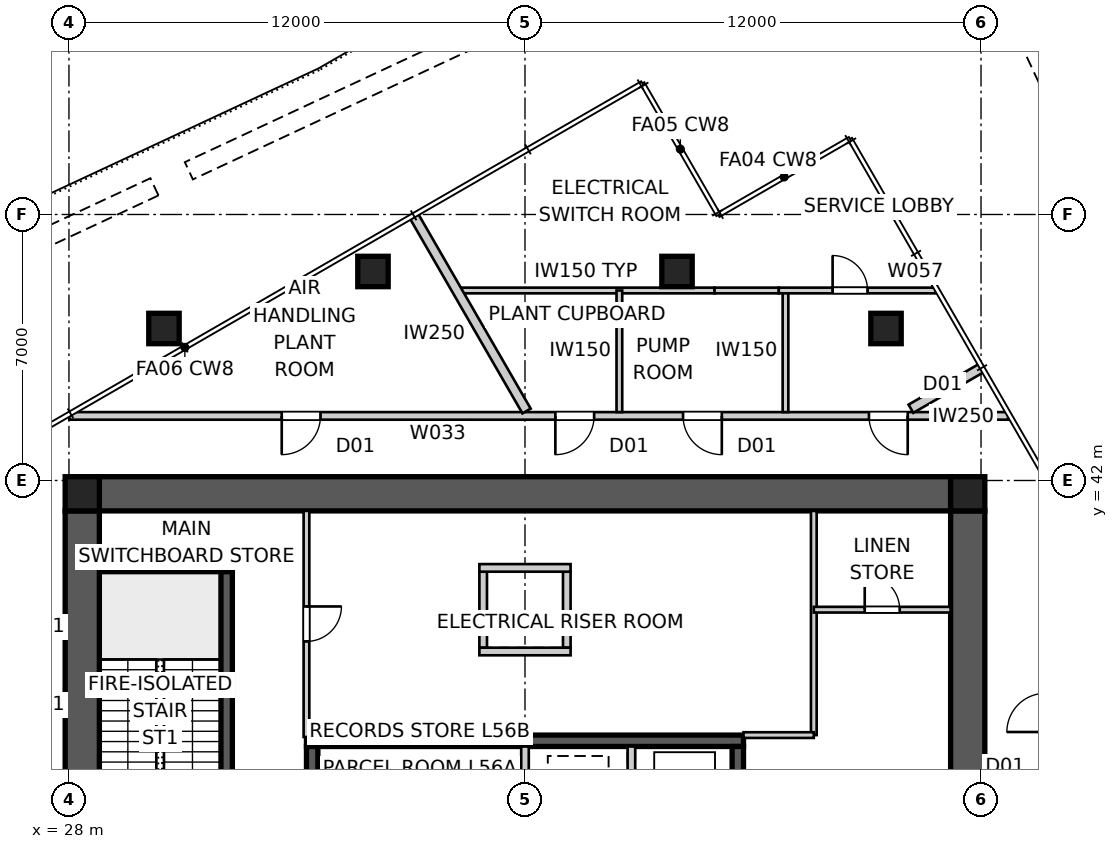
"""IFC4 building model, lengths in metres.
Left out: names, types, materials, properties, quantities, classifications, styles, units other than length and angle.
Written with IfcOpenShell. Run it as: python <this file> out.ifc"""

import sys

from ifc_helpers import new_model, si_unit, direction, frame, frame_2d, origin, origin_2d, place, context, subcontext, project, spatial, polyline, rectangle, outline, extrude, element, fill, save


model = new_model("IFC4")
c1 = context("Model", 3, precision=1e-05, world=origin(), true_north=direction((0.0, 1.0)))
c2 = subcontext(c1, "Body", "Model", "MODEL_VIEW")
j1 = project(units=[si_unit("LENGTHUNIT", "METRE"), si_unit("PLANEANGLEUNIT", "RADIAN")], contexts=[c1])
p1 = place(None, origin())
s1 = spatial("IfcSite", under=j1, at=p1, CompositionType="ELEMENT")
p2 = place(p1, origin())
s2 = spatial("IfcBuilding", under=s1, at=p2, CompositionType="ELEMENT")
p3 = place(p2, frame((0.0, 0.0, 203.2)))
s3 = spatial("IfcBuildingStorey", under=s2, at=p3, CompositionType="ELEMENT", Elevation=203.2)
p4 = place(p3, frame((28.8, 41.65, 0.0), z_axis=(0.0, 0.0, 1.0), x_axis=(1.0, 0.0, 0.0)))
e1 = element("IfcWall", 1, at=p4, inside=s3, PredefinedType="SHEAR", context=c2, shape_type="SweptSolid", body=[
    extrude(outline(polyline([(0.0, -0.45), (22.4, -0.45), (22.4, -0.025), (22.85, -0.025), (22.85, 0.025), (22.4, 0.025), (22.4, 0.45), (0.0, 0.45), (0.0, 0.025), (-0.45, 0.025), (-0.45, -0.025), (0.0, -0.025), (0.0, -0.45)])), origin(), (0.0, 0.0, 1.0), 5.0),
])
p5 = place(p3, frame((51.65, 18.8, 0.0), z_axis=(0.0, 0.0, 1.0), x_axis=(0.0, 1.0, 0.0)))
e2 = element("IfcWall", 2, at=p5, inside=s3, PredefinedType="SHEAR", context=c2, shape_type="SweptSolid", body=[
    extrude(outline(polyline([(0.0, -0.45), (22.4, -0.45), (22.4, -0.025), (22.85, -0.025), (22.85, 0.025), (22.4, 0.025), (22.4, 0.45), (0.0, 0.45), (0.0, 0.025), (-0.45, 0.025), (-0.45, -0.025), (0.0, -0.025), (0.0, -0.45)])), origin(), (0.0, 0.0, 1.0), 5.0),
])
p6 = place(p5, frame((11.14, 0.0, 0.0)))
e3 = element("IfcOpeningElement", 3, at=p6, cuts=e2, PredefinedType="OPENING", context=c2, shape_type="SweptSolid", body=[
    extrude(rectangle(XDim=1.02, YDim=2.4, at=frame_2d((0.51, 1.2))), frame((0.0, 0.46, 0.0), z_axis=(0.0, -1.0, 0.0), x_axis=(1.0, 0.0, 0.0)), (0.0, 0.0, 1.0), 0.92),
])
p7 = place(p3, frame((28.35, 41.2, 0.0), z_axis=(0.0, 0.0, 1.0), x_axis=(0.0, -1.0, 0.0)))
e4 = element("IfcWall", 4, at=p7, inside=s3, PredefinedType="SHEAR", context=c2, shape_type="SweptSolid", body=[
    extrude(outline(polyline([(0.0, -0.45), (22.4, -0.45), (22.4, -0.025), (22.85, -0.025), (22.85, 0.025), (22.4, 0.025), (22.4, 0.45), (0.0, 0.45), (0.0, 0.025), (-0.45, 0.025), (-0.45, -0.025), (0.0, -0.025), (0.0, -0.45)])), origin(), (0.0, 0.0, 1.0), 5.0),
])
p8 = place(p7, frame((11.14, 0.0, 0.0)))
e5 = element("IfcOpeningElement", 5, at=p8, cuts=e4, PredefinedType="OPENING", context=c2, shape_type="SweptSolid", body=[
    extrude(rectangle(XDim=1.02, YDim=2.4, at=frame_2d((0.51, 1.2))), frame((0.0, 0.46, 0.0), z_axis=(0.0, -1.0, 0.0), x_axis=(1.0, 0.0, 0.0)), (0.0, 0.0, 1.0), 0.92),
])
p9 = place(p3, frame((34.25, 35.15, 0.0), z_axis=(0.0, 0.0, 1.0), x_axis=(1.0, 0.0, 0.0)))
e6 = element("IfcWall", 6, at=p9, inside=s3, PredefinedType="SHEAR", context=c2, shape_type="SweptSolid", body=[
    extrude(rectangle(XDim=11.5, YDim=0.3, at=frame_2d((5.75, 0.0))), origin(), (0.0, 0.0, 1.0), 5.0),
])
p10 = place(p3, frame((34.4, 32.2, 0.0), z_axis=(0.0, 0.0, 1.0), x_axis=(0.0, 1.0, 0.0)))
e7 = element("IfcWall", 7, at=p10, inside=s3, PredefinedType="SHEAR", context=c2, shape_type="SweptSolid", body=[
    extrude(rectangle(XDim=2.8, YDim=0.3, at=frame_2d((1.4, 0.0))), origin(), (0.0, 0.0, 1.0), 5.0),
])
for number, where, z_axis, x_axis in (
    (8, (40.0, 32.2, 0.0), (0.0, 0.0, 1.0), (0.0, 1.0, 0.0)),
    (9, (42.8, 32.2, 0.0), (0.0, 0.0, 1.0), (0.0, 1.0, 0.0)),
):
    element("IfcWall", number, at=place(p3, frame(where, z_axis=z_axis, x_axis=x_axis)), inside=s3, PredefinedType="SOLIDWALL", context=c2, shape_type="SweptSolid", body=[
        extrude(rectangle(XDim=2.8, YDim=0.2, at=frame_2d((1.4, 0.0))), origin(), (0.0, 0.0, 1.0), 5.0),
    ])
p11 = place(p3, frame((45.6, 32.2, 0.0), z_axis=(0.0, 0.0, 1.0), x_axis=(0.0, 1.0, 0.0)))
e10 = element("IfcWall", 10, at=p11, inside=s3, PredefinedType="SHEAR", context=c2, shape_type="SweptSolid", body=[
    extrude(rectangle(XDim=2.8, YDim=0.3, at=frame_2d((1.4, 0.0))), origin(), (0.0, 0.0, 1.0), 5.0),
])
p12 = place(p3, frame((32.15, 32.2, 0.0), z_axis=(0.0, 0.0, 1.0), x_axis=(0.0, 1.0, 0.0)))
e11 = element("IfcWall", 11, at=p12, inside=s3, PredefinedType="SHEAR", context=c2, shape_type="SweptSolid", body=[
    extrude(rectangle(XDim=7.7, YDim=0.3, at=frame_2d((3.85, 0.0))), origin(), (0.0, 0.0, 1.0), 5.0),
])
p13 = place(p3, frame((28.8, 39.75, 0.0), z_axis=(0.0, 0.0, 1.0), x_axis=(1.0, 0.0, 0.0)))
e12 = element("IfcWall", 12, at=p13, inside=s3, PredefinedType="SHEAR", context=c2, shape_type="SweptSolid", body=[
    extrude(rectangle(XDim=3.5, YDim=0.3, at=frame_2d((1.75, 0.0))), origin(), (0.0, 0.0, 1.0), 5.0),
])
for number, where, z_axis, x_axis in (
    (13, (38.9, 37.6, 0.0), (0.0, 0.0, 1.0), (0.0, 1.0, 0.0)),
    (14, (41.1, 37.6, 0.0), (0.0, 0.0, 1.0), (0.0, 1.0, 0.0)),
):
    element("IfcWall", number, at=place(p3, frame(where, z_axis=z_axis, x_axis=x_axis)), inside=s3, PredefinedType="SOLIDWALL", context=c2, shape_type="SweptSolid", body=[
        extrude(rectangle(XDim=2.0, YDim=0.2, at=frame_2d((1.0, 0.0))), origin(), (0.0, 0.0, 1.0), 5.0),
    ])
for number, where, z_axis, x_axis in (
    (15, (38.8, 37.5, 0.0), (0.0, 0.0, 1.0), (1.0, 0.0, 0.0)),
    (16, (38.8, 39.7, 0.0), (0.0, 0.0, 1.0), (1.0, 0.0, 0.0)),
):
    element("IfcWall", number, at=place(p3, frame(where, z_axis=z_axis, x_axis=x_axis)), inside=s3, PredefinedType="SOLIDWALL", context=c2, shape_type="SweptSolid", body=[
        extrude(rectangle(XDim=2.4, YDim=0.2, at=frame_2d((1.2, 0.0))), origin(), (0.0, 0.0, 1.0), 5.0),
    ])
for number, where, z_axis, x_axis in (
    (17, (51.65, 41.65, 0.0), (0.0, 0.0, 1.0), (1.0, 0.0, 0.0)),
    (18, (28.35, 41.65, 0.0), (0.0, 0.0, 1.0), (1.0, 0.0, 0.0)),
):
    element("IfcColumn", number, at=place(p3, frame(where, z_axis=z_axis, x_axis=x_axis)), inside=s3, PredefinedType="COLUMN", context=c2, shape_type="SweptSolid", body=[
        extrude(rectangle(XDim=0.9, YDim=0.9, at=origin_2d()), origin(), (0.0, 0.0, 1.0), 5.0),
    ])
for number, where, z_axis, x_axis in (
    (19, (49.5, 46.0, 0.0), (0.0, 0.0, 1.0), (1.0, 0.0, 0.0)),
    (20, (44.0, 47.5, 0.0), (0.0, 0.0, 1.0), (1.0, 0.0, 0.0)),
    (21, (36.0, 47.5, 0.0), (0.0, 0.0, 1.0), (1.0, 0.0, 0.0)),
    (22, (30.5, 46.0, 0.0), (0.0, 0.0, 1.0), (1.0, 0.0, 0.0)),
):
    element("IfcColumn", number, at=place(p3, frame(where, z_axis=z_axis, x_axis=x_axis)), inside=s3, PredefinedType="COLUMN", context=c2, shape_type="SweptSolid", body=[
        extrude(rectangle(XDim=0.8, YDim=0.8, at=origin_2d()), origin(), (0.0, 0.0, 1.0), 5.0),
    ])
p14 = place(p3, frame((52.713, 43.7, 0.0), z_axis=(0.0, 0.0, 1.0), x_axis=(-1.0, 0.0, 0.0)))
e23 = element("IfcWall", 23, at=p14, inside=s3, PredefinedType="PARTITIONING", context=c2, shape_type="SweptSolid", body=[
    extrude(rectangle(XDim=24.704, YDim=0.2, at=frame_2d((12.352, 0.0))), origin(), (0.0, 0.0, 1.0), 4.85),
])
p15 = place(p14, frame((18.094, 0.0, 0.0)))
e24 = element("IfcOpeningElement", 24, at=p15, cuts=e23, PredefinedType="OPENING", context=c2, shape_type="SweptSolid", body=[
    extrude(rectangle(XDim=1.02, YDim=2.34, at=frame_2d((0.51, 1.17))), frame((0.0, 0.11, 0.0), z_axis=(0.0, -1.0, 0.0), x_axis=(1.0, 0.0, 0.0)), (0.0, 0.0, 1.0), 0.22),
])
p16 = place(p14, frame((2.642, 0.0, 0.0)))
e25 = element("IfcOpeningElement", 25, at=p16, cuts=e23, PredefinedType="OPENING", context=c2, shape_type="SweptSolid", body=[
    extrude(rectangle(XDim=1.02, YDim=2.34, at=frame_2d((0.51, 1.17))), frame((0.0, 0.11, 0.0), z_axis=(0.0, -1.0, 0.0), x_axis=(1.0, 0.0, 0.0)), (0.0, 0.0, 1.0), 0.22),
])
p17 = place(p14, frame((7.534, 0.0, 0.0)))
e26 = element("IfcOpeningElement", 26, at=p17, cuts=e23, PredefinedType="OPENING", context=c2, shape_type="SweptSolid", body=[
    extrude(rectangle(XDim=1.02, YDim=2.34, at=frame_2d((0.51, 1.17))), frame((0.0, 0.11, 0.0), z_axis=(0.0, -1.0, 0.0), x_axis=(1.0, 0.0, 0.0)), (0.0, 0.0, 1.0), 0.22),
])
p18 = place(p14, frame((10.894, 0.0, 0.0)))
e27 = element("IfcOpeningElement", 27, at=p18, cuts=e23, PredefinedType="OPENING", context=c2, shape_type="SweptSolid", body=[
    extrude(rectangle(XDim=1.02, YDim=2.34, at=frame_2d((0.51, 1.17))), frame((0.0, 0.11, 0.0), z_axis=(0.0, -1.0, 0.0), x_axis=(1.0, 0.0, 0.0)), (0.0, 0.0, 1.0), 0.22),
])
p19 = place(p3, frame((52.027, 44.969, 0.0), z_axis=(0.0, 0.0, 1.0), x_axis=(-0.865974878747, -0.500087501723, 0.0)))
e28 = element("IfcWall", 28, at=p19, inside=s3, PredefinedType="PARTITIONING", context=c2, shape_type="SweptSolid", body=[
    extrude(rectangle(XDim=2.161, YDim=0.25, at=frame_2d((1.081, 0.0))), origin(), (0.0, 0.0, 1.0), 4.85),
])
p20 = place(p3, frame((37.069, 48.977, 0.0), z_axis=(0.0, 0.0, 1.0), x_axis=(0.500021028785, -0.866013262469, 0.0)))
e29 = element("IfcWall", 29, at=p20, inside=s3, PredefinedType="PARTITIONING", context=c2, shape_type="SweptSolid", body=[
    extrude(rectangle(XDim=5.946, YDim=0.25, at=frame_2d((2.973, 0.0))), origin(), (0.0, 0.0, 1.0), 4.85),
])
p21 = place(p3, frame((34.25, 41.2, 0.0), z_axis=(0.0, 0.0, 1.0), x_axis=(0.0, -1.0, 0.0)))
e30 = element("IfcWall", 30, at=p21, inside=s3, PredefinedType="SOLIDWALL", context=c2, shape_type="SweptSolid", body=[
    extrude(rectangle(XDim=5.95, YDim=0.15, at=frame_2d((2.975, 0.0))), origin(), (0.0, 0.0, 1.0), 4.85),
])
p22 = place(p21, frame((2.515, 0.0, 0.0)))
e31 = element("IfcOpeningElement", 31, at=p22, cuts=e30, PredefinedType="OPENING", context=c2, shape_type="SweptSolid", body=[
    extrude(rectangle(XDim=0.92, YDim=2.1, at=frame_2d((0.46, 1.05))), frame((0.0, 0.085, 0.0), z_axis=(0.0, -1.0, 0.0), x_axis=(1.0, 0.0, 0.0)), (0.0, 0.0, 1.0), 0.17),
])
p23 = place(p3, frame((47.6, 41.2, 0.0), z_axis=(0.0, 0.0, 1.0), x_axis=(0.0, -1.0, 0.0)))
e32 = element("IfcWall", 32, at=p23, inside=s3, PredefinedType="SOLIDWALL", context=c2, shape_type="SweptSolid", body=[
    extrude(rectangle(XDim=5.9, YDim=0.15, at=frame_2d((2.95, 0.0))), origin(), (0.0, 0.0, 1.0), 4.85),
])
p24 = place(p3, frame((47.6, 35.3, 0.0), z_axis=(0.0, 0.0, 1.0), x_axis=(-1.0, 0.0, 0.0)))
e33 = element("IfcWall", 33, at=p24, inside=s3, PredefinedType="SOLIDWALL", context=c2, shape_type="SweptSolid", body=[
    extrude(rectangle(XDim=1.85, YDim=0.15, at=frame_2d((0.925, 0.0))), origin(), (0.0, 0.0, 1.0), 4.85),
])
p25 = place(p3, frame((47.6, 38.6, 0.0), z_axis=(0.0, 0.0, 1.0), x_axis=(1.0, 0.0, 0.0)))
e34 = element("IfcWall", 34, at=p25, inside=s3, PredefinedType="SOLIDWALL", context=c2, shape_type="SweptSolid", body=[
    extrude(rectangle(XDim=3.6, YDim=0.15, at=frame_2d((1.8, 0.0))), origin(), (0.0, 0.0, 1.0), 4.85),
])
p26 = place(p25, frame((1.34, 0.0, 0.0)))
e35 = element("IfcOpeningElement", 35, at=p26, cuts=e34, PredefinedType="OPENING", context=c2, shape_type="SweptSolid", body=[
    extrude(rectangle(XDim=0.92, YDim=2.1, at=frame_2d((0.46, 1.05))), frame((0.0, 0.085, 0.0), z_axis=(0.0, -1.0, 0.0), x_axis=(1.0, 0.0, 0.0)), (0.0, 0.0, 1.0), 0.17),
])
p27 = place(p3, frame((46.855, 43.8, 0.0), z_axis=(0.0, 0.0, 1.0), x_axis=(0.0, 1.0, 0.0)))
e36 = element("IfcWall", 36, at=p27, inside=s3, PredefinedType="SOLIDWALL", context=c2, shape_type="SweptSolid", body=[
    extrude(rectangle(XDim=3.2, YDim=0.15, at=frame_2d((1.6, 0.0))), origin(), (0.0, 0.0, 1.0), 4.85),
])
p28 = place(p3, frame((38.21, 47.0, 0.0), z_axis=(0.0, 0.0, 1.0), x_axis=(1.0, 0.0, 0.0)))
e37 = element("IfcWall", 37, at=p28, inside=s3, PredefinedType="SOLIDWALL", context=c2, shape_type="SweptSolid", body=[
    extrude(rectangle(XDim=6.778, YDim=0.15, at=frame_2d((3.389, 0.0))), origin(), (0.0, 0.0, 1.0), 4.85),
])
p29 = place(p3, frame((44.988, 47.0, 0.0), z_axis=(0.0, 0.0, 1.0), x_axis=(1.0, 0.0, 0.0)))
e38 = element("IfcWall", 38, at=p29, inside=s3, PredefinedType="SOLIDWALL", context=c2, shape_type="SweptSolid", body=[
    extrude(rectangle(XDim=1.69, YDim=0.15, at=frame_2d((0.845, 0.0))), origin(), (0.0, 0.0, 1.0), 3.85),
])
p30 = place(p3, frame((46.678, 47.0, 0.0), z_axis=(0.0, 0.0, 1.0), x_axis=(1.0, 0.0, 0.0)))
e39 = element("IfcWall", 39, at=p30, inside=s3, PredefinedType="SOLIDWALL", context=c2, shape_type="SweptSolid", body=[
    extrude(rectangle(XDim=4.13, YDim=0.15, at=frame_2d((2.065, 0.0))), origin(), (0.0, 0.0, 1.0), 4.85),
])
p31 = place(p30, frame((1.416, 0.0, 0.0)))
e40 = element("IfcOpeningElement", 40, at=p31, cuts=e39, PredefinedType="OPENING", context=c2, shape_type="SweptSolid", body=[
    extrude(rectangle(XDim=0.92, YDim=2.1, at=frame_2d((0.46, 1.05))), frame((0.0, 0.085, 0.0), z_axis=(0.0, -1.0, 0.0), x_axis=(1.0, 0.0, 0.0)), (0.0, 0.0, 1.0), 0.17),
])
p32 = place(p3, frame((42.484, 43.8, 0.0), z_axis=(0.0, 0.0, 1.0), x_axis=(0.0, 1.0, 0.0)))
e41 = element("IfcWall", 41, at=p32, inside=s3, PredefinedType="SOLIDWALL", context=c2, shape_type="SweptSolid", body=[
    extrude(rectangle(XDim=3.2, YDim=0.15, at=frame_2d((1.6, 0.0))), origin(), (0.0, 0.0, 1.0), 4.85),
])
p33 = place(p15, origin())
e42 = element("IfcDoor", 42, at=p33, inside=s3, OperationType="SINGLE_SWING_RIGHT", PredefinedType="DOOR", context=c2, shape_type="SweptSolid", body=[
    extrude(rectangle(XDim=1.02, YDim=2.34, at=frame_2d((0.51, 1.17))), frame((0.0, 0.025, 0.0), z_axis=(0.0, -1.0, 0.0), x_axis=(1.0, 0.0, 0.0)), (0.0, 0.0, 1.0), 0.05),
])
fill(e24, e42)
p34 = place(p16, origin())
e43 = element("IfcDoor", 43, at=p34, inside=s3, OperationType="SINGLE_SWING_LEFT", PredefinedType="DOOR", context=c2, shape_type="SweptSolid", body=[
    extrude(rectangle(XDim=1.02, YDim=2.34, at=frame_2d((0.51, 1.17))), frame((0.0, 0.025, 0.0), z_axis=(0.0, -1.0, 0.0), x_axis=(1.0, 0.0, 0.0)), (0.0, 0.0, 1.0), 0.05),
])
fill(e25, e43)
p35 = place(p17, origin())
e44 = element("IfcDoor", 44, at=p35, inside=s3, OperationType="SINGLE_SWING_LEFT", PredefinedType="DOOR", context=c2, shape_type="SweptSolid", body=[
    extrude(rectangle(XDim=1.02, YDim=2.34, at=frame_2d((0.51, 1.17))), frame((0.0, 0.025, 0.0), z_axis=(0.0, -1.0, 0.0), x_axis=(1.0, 0.0, 0.0)), (0.0, 0.0, 1.0), 0.05),
])
fill(e26, e44)
p36 = place(p18, origin())
e45 = element("IfcDoor", 45, at=p36, inside=s3, OperationType="SINGLE_SWING_RIGHT", PredefinedType="DOOR", context=c2, shape_type="SweptSolid", body=[
    extrude(rectangle(XDim=1.02, YDim=2.34, at=frame_2d((0.51, 1.17))), frame((0.0, 0.025, 0.0), z_axis=(0.0, -1.0, 0.0), x_axis=(1.0, 0.0, 0.0)), (0.0, 0.0, 1.0), 0.05),
])
fill(e27, e45)
p37 = place(p26, origin())
e46 = element("IfcDoor", 46, at=p37, inside=s3, OperationType="SINGLE_SWING_LEFT", PredefinedType="DOOR", context=c2, shape_type="SweptSolid", body=[
    extrude(rectangle(XDim=0.92, YDim=2.1, at=frame_2d((0.46, 1.05))), frame((0.0, 0.025, 0.0), z_axis=(0.0, -1.0, 0.0), x_axis=(1.0, 0.0, 0.0)), (0.0, 0.0, 1.0), 0.05),
])
fill(e35, e46)
p38 = place(p22, origin())
e47 = element("IfcDoor", 47, at=p38, inside=s3, OperationType="SINGLE_SWING_LEFT", PredefinedType="DOOR", context=c2, shape_type="SweptSolid", body=[
    extrude(rectangle(XDim=0.92, YDim=2.1, at=frame_2d((0.46, 1.05))), frame((0.0, 0.025, 0.0), z_axis=(0.0, -1.0, 0.0), x_axis=(1.0, 0.0, 0.0)), (0.0, 0.0, 1.0), 0.05),
])
fill(e31, e47)
p39 = place(p31, origin())
e48 = element("IfcDoor", 48, at=p39, inside=s3, OperationType="SINGLE_SWING_LEFT", PredefinedType="DOOR", context=c2, shape_type="SweptSolid", body=[
    extrude(rectangle(XDim=0.92, YDim=2.1, at=frame_2d((0.46, 1.05))), frame((0.0, 0.025, 0.0), z_axis=(0.0, -1.0, 0.0), x_axis=(1.0, 0.0, 0.0)), (0.0, 0.0, 1.0), 0.05),
])
fill(e40, e48)
save(model, sys.argv[1])
